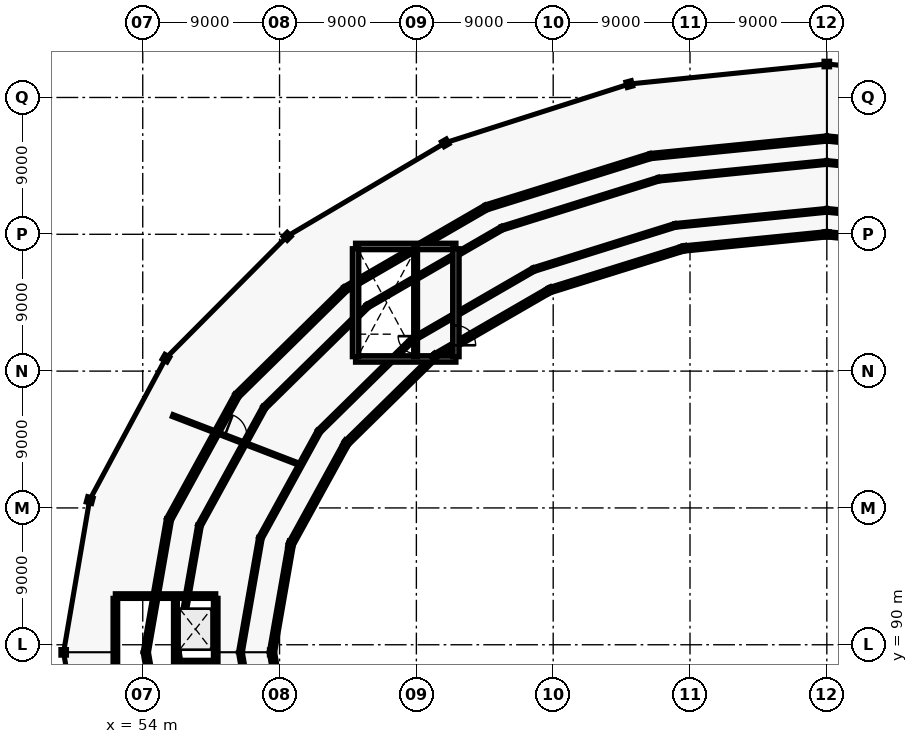
"""IFC4 building model, lengths in metres.
Left out: names, types, materials, properties, quantities, classifications, styles, units other than length and angle.
Written with IfcOpenShell. Run it as: python <this file> out.ifc"""

import sys

from ifc_helpers import new_model, si_unit, direction, frame, frame_2d, origin, origin_2d, place, context, subcontext, project, spatial, rectangle, hollow_circle, extrude, element, fill, save


model = new_model("IFC4")
c1 = context("Model", 3, precision=1e-05, world=origin(), true_north=direction((0.0, 1.0)))
c2 = subcontext(c1, "Body", "Model", "MODEL_VIEW")
j1 = project(units=[si_unit("LENGTHUNIT", "METRE"), si_unit("PLANEANGLEUNIT", "RADIAN")], contexts=[c1])
p1 = place(None, origin())
s1 = spatial("IfcSite", under=j1, at=p1, CompositionType="ELEMENT")
p2 = place(p1, origin())
s2 = spatial("IfcBuilding", under=s1, at=p2, CompositionType="ELEMENT")
p3 = place(p2, frame((0.0, 0.0, 9.6)))
s3 = spatial("IfcBuildingStorey", under=s2, at=p3, CompositionType="ELEMENT", Elevation=9.6)
p4 = place(p3, frame((99.0, 117.0, 0.0), z_axis=(0.0, 0.0, 1.0), x_axis=(0.0, 1.0, 0.0)))
e1 = element("IfcColumn", 1, at=p4, inside=s3, PredefinedType="COLUMN", context=c2, shape_type="SweptSolid", body=[
    extrude(hollow_circle(Radius=0.162, WallThickness=0.016, at=origin_2d()), origin(), (0.0, 0.0, 1.0), 4.38),
])
p5 = place(p3, frame((99.0, 128.2, 0.0), z_axis=(0.0, 0.0, 1.0), x_axis=(0.0, 1.0, 0.0)))
e2 = element("IfcColumn", 2, at=p5, inside=s3, PredefinedType="COLUMN", context=c2, shape_type="SweptSolid", body=[
    extrude(hollow_circle(Radius=0.178, WallThickness=0.016, at=origin_2d()), origin(), (0.0, 0.0, 1.0), 3.38),
])
p6 = place(p3, frame((89.553, 116.063, 0.0), z_axis=(0.0, 0.0, 1.0), x_axis=(-0.258819045103, 0.965925826289, 0.0)))
e3 = element("IfcColumn", 3, at=p6, inside=s3, PredefinedType="COLUMN", context=c2, shape_type="SweptSolid", body=[
    extrude(hollow_circle(Radius=0.162, WallThickness=0.016, at=origin_2d()), origin(), (0.0, 0.0, 1.0), 4.38),
])
p7 = place(p3, frame((86.007, 126.881, 0.0), z_axis=(0.0, 0.0, 1.0), x_axis=(-0.258819045103, 0.965925826289, 0.0)))
e4 = element("IfcColumn", 4, at=p7, inside=s3, PredefinedType="COLUMN", context=c2, shape_type="SweptSolid", body=[
    extrude(hollow_circle(Radius=0.178, WallThickness=0.016, at=origin_2d()), origin(), (0.0, 0.0, 1.0), 3.38),
])
p8 = place(p3, frame((80.75, 113.316, 0.0), z_axis=(0.0, 0.0, 1.0), x_axis=(-0.5, 0.866025403784, 0.0)))
e5 = element("IfcColumn", 5, at=p8, inside=s3, PredefinedType="COLUMN", context=c2, shape_type="SweptSolid", body=[
    extrude(hollow_circle(Radius=0.162, WallThickness=0.016, at=origin_2d()), origin(), (0.0, 0.0, 1.0), 4.38),
])
p9 = place(p3, frame((73.9, 123.015, 0.0), z_axis=(0.0, 0.0, 1.0), x_axis=(-0.5, 0.866025403784, 0.0)))
e6 = element("IfcColumn", 6, at=p9, inside=s3, PredefinedType="COLUMN", context=c2, shape_type="SweptSolid", body=[
    extrude(hollow_circle(Radius=0.178, WallThickness=0.016, at=origin_2d()), origin(), (0.0, 0.0, 1.0), 3.38),
])
p10 = place(p3, frame((73.191, 108.945, 0.0), z_axis=(0.0, 0.0, 1.0), x_axis=(-0.707106781187, 0.707106781187, 0.0)))
e7 = element("IfcColumn", 7, at=p10, inside=s3, PredefinedType="COLUMN", context=c2, shape_type="SweptSolid", body=[
    extrude(hollow_circle(Radius=0.162, WallThickness=0.016, at=origin_2d()), origin(), (0.0, 0.0, 1.0), 4.38),
])
p11 = place(p3, frame((63.503, 116.865, 0.0), z_axis=(0.0, 0.0, 1.0), x_axis=(-0.707106781187, 0.707106781187, 0.0)))
e8 = element("IfcColumn", 8, at=p11, inside=s3, PredefinedType="COLUMN", context=c2, shape_type="SweptSolid", body=[
    extrude(hollow_circle(Radius=0.178, WallThickness=0.016, at=origin_2d()), origin(), (0.0, 0.0, 1.0), 3.38),
])
p12 = place(p3, frame((67.39, 103.25, 0.0), z_axis=(0.0, 0.0, 1.0), x_axis=(-0.866025403784, 0.5, 0.0)))
e9 = element("IfcColumn", 9, at=p12, inside=s3, PredefinedType="COLUMN", context=c2, shape_type="SweptSolid", body=[
    extrude(hollow_circle(Radius=0.162, WallThickness=0.016, at=origin_2d()), origin(), (0.0, 0.0, 1.0), 4.38),
])
p13 = place(p3, frame((55.526, 108.85, 0.0), z_axis=(0.0, 0.0, 1.0), x_axis=(-0.866025403784, 0.5, 0.0)))
e10 = element("IfcColumn", 10, at=p13, inside=s3, PredefinedType="COLUMN", context=c2, shape_type="SweptSolid", body=[
    extrude(hollow_circle(Radius=0.178, WallThickness=0.016, at=origin_2d()), origin(), (0.0, 0.0, 1.0), 3.38),
])
p14 = place(p3, frame((63.744, 96.618, 0.0), z_axis=(0.0, 0.0, 1.0), x_axis=(-0.965925826289, 0.258819045103, 0.0)))
e11 = element("IfcColumn", 11, at=p14, inside=s3, PredefinedType="COLUMN", context=c2, shape_type="SweptSolid", body=[
    extrude(hollow_circle(Radius=0.162, WallThickness=0.016, at=origin_2d()), origin(), (0.0, 0.0, 1.0), 4.38),
])
p15 = place(p3, frame((50.511, 99.516, 0.0), z_axis=(0.0, 0.0, 1.0), x_axis=(-0.965925826289, 0.258819045103, 0.0)))
e12 = element("IfcColumn", 12, at=p15, inside=s3, PredefinedType="COLUMN", context=c2, shape_type="SweptSolid", body=[
    extrude(hollow_circle(Radius=0.178, WallThickness=0.016, at=origin_2d()), origin(), (0.0, 0.0, 1.0), 3.38),
])
p16 = place(p3, frame((62.5, 89.5, 0.0), z_axis=(0.0, 0.0, 1.0), x_axis=(-1.0, 0.0, 0.0)))
e13 = element("IfcColumn", 13, at=p16, inside=s3, PredefinedType="COLUMN", context=c2, shape_type="SweptSolid", body=[
    extrude(hollow_circle(Radius=0.162, WallThickness=0.016, at=origin_2d()), origin(), (0.0, 0.0, 1.0), 4.38),
])
p17 = place(p3, frame((48.8, 89.5, 0.0), z_axis=(0.0, 0.0, 1.0), x_axis=(-1.0, 0.0, 0.0)))
e14 = element("IfcColumn", 14, at=p17, inside=s3, PredefinedType="COLUMN", context=c2, shape_type="SweptSolid", body=[
    extrude(hollow_circle(Radius=0.178, WallThickness=0.016, at=origin_2d()), origin(), (0.0, 0.0, 1.0), 3.38),
])
p18 = place(p3, frame((110.595, 122.148, 4.53), z_axis=(0.0, 0.0, 1.0), x_axis=(-0.995099849345, 0.098875122419, 0.0)))
e15 = element("IfcWall", 15, at=p18, inside=s3, PredefinedType="SOLIDWALL", context=c2, shape_type="SweptSolid", body=[
    extrude(rectangle(XDim=11.652, YDim=0.34, at=frame_2d((5.826, 0.0))), origin(), (0.0, 0.0, 1.0), 3.02),
])
p19 = place(p3, frame((108.447, 116.063, 4.39), z_axis=(0.0, 0.0, 1.0), x_axis=(-0.995117073258, 0.098701623651, 0.0)))
e16 = element("IfcWall", 16, at=p19, inside=s3, PredefinedType="SOLIDWALL", context=c2, shape_type="SweptSolid", body=[
    extrude(rectangle(XDim=9.493, YDim=0.34, at=frame_2d((4.747, 0.0))), origin(), (0.0, 0.0, 1.0), 3.16),
])
p20 = place(p3, frame((110.058, 120.627, 7.58), z_axis=(0.0, 0.0, 1.0), x_axis=(-0.995105258288, 0.098820670548, 0.0)))
e17 = element("IfcWall", 17, at=p20, inside=s3, PredefinedType="SOLIDWALL", context=c2, shape_type="SweptSolid", body=[
    extrude(rectangle(XDim=11.113, YDim=0.24, at=frame_2d((5.556, 0.0))), origin(), (0.0, 0.0, 1.0), 2.37),
])
p21 = place(p3, frame((108.984, 117.584, 7.58), z_axis=(0.0, 0.0, 1.0), x_axis=(-0.995110163253, 0.098771266021, 0.0)))
e18 = element("IfcWall", 18, at=p21, inside=s3, PredefinedType="SOLIDWALL", context=c2, shape_type="SweptSolid", body=[
    extrude(rectangle(XDim=10.033, YDim=0.24, at=frame_2d((5.017, 0.0))), origin(), (0.0, 0.0, 1.0), 2.37),
])
p22 = place(p3, frame((99.0, 123.3, 4.53), z_axis=(0.0, 0.0, 1.0), x_axis=(-0.995099849345, -0.098875122419, 0.0)))
e19 = element("IfcWall", 19, at=p22, inside=s3, PredefinedType="SOLIDWALL", context=c2, shape_type="SweptSolid", body=[
    extrude(rectangle(XDim=11.652, YDim=0.34, at=frame_2d((5.826, 0.0))), origin(), (0.0, 0.0, 1.0), 3.02),
])
p23 = place(p3, frame((99.0, 117.0, 4.39), z_axis=(0.0, 0.0, 1.0), x_axis=(-0.995117073258, -0.098701623651, 0.0)))
e20 = element("IfcWall", 20, at=p23, inside=s3, PredefinedType="SOLIDWALL", context=c2, shape_type="SweptSolid", body=[
    extrude(rectangle(XDim=9.493, YDim=0.34, at=frame_2d((4.747, 0.0))), origin(), (0.0, 0.0, 1.0), 3.16),
])
p24 = place(p3, frame((99.0, 121.725, 7.58), z_axis=(0.0, 0.0, 1.0), x_axis=(-0.995105258288, -0.098820670548, 0.0)))
e21 = element("IfcWall", 21, at=p24, inside=s3, PredefinedType="SOLIDWALL", context=c2, shape_type="SweptSolid", body=[
    extrude(rectangle(XDim=11.113, YDim=0.24, at=frame_2d((5.556, 0.0))), origin(), (0.0, 0.0, 1.0), 2.37),
])
p25 = place(p3, frame((99.0, 118.575, 7.58), z_axis=(0.0, 0.0, 1.0), x_axis=(-0.995110163253, -0.098771266021, 0.0)))
e22 = element("IfcWall", 22, at=p25, inside=s3, PredefinedType="SOLIDWALL", context=c2, shape_type="SweptSolid", body=[
    extrude(rectangle(XDim=10.033, YDim=0.24, at=frame_2d((5.017, 0.0))), origin(), (0.0, 0.0, 1.0), 2.37),
])
p26 = place(p3, frame((87.405, 122.148, 4.53), z_axis=(0.0, 0.0, 1.0), x_axis=(-0.95449417592, -0.298229556107, 0.0)))
e23 = element("IfcWall", 23, at=p26, inside=s3, PredefinedType="SOLIDWALL", context=c2, shape_type="SweptSolid", body=[
    extrude(rectangle(XDim=11.32, YDim=0.34, at=frame_2d((5.66, 0.0))), origin(), (0.0, 0.0, 1.0), 3.02),
])
p27 = place(p3, frame((89.553, 116.063, 4.39), z_axis=(0.0, 0.0, 1.0), x_axis=(-0.9545990852, -0.297893582568, 0.0)))
e24 = element("IfcWall", 24, at=p27, inside=s3, PredefinedType="SOLIDWALL", context=c2, shape_type="SweptSolid", body=[
    extrude(rectangle(XDim=9.222, YDim=0.34, at=frame_2d((4.611, 0.0))), origin(), (0.0, 0.0, 1.0), 3.16),
])
p28 = place(p3, frame((87.942, 120.627, 7.58), z_axis=(0.0, 0.0, 1.0), x_axis=(-0.954506131601, -0.298191288832, 0.0)))
e25 = element("IfcWall", 25, at=p28, inside=s3, PredefinedType="SOLIDWALL", context=c2, shape_type="SweptSolid", body=[
    extrude(rectangle(XDim=10.795, YDim=0.24, at=frame_2d((5.397, 0.0))), origin(), (0.0, 0.0, 1.0), 2.37),
])
p29 = place(p3, frame((89.016, 117.584, 7.58), z_axis=(0.0, 0.0, 1.0), x_axis=(-0.954573536026, -0.297975442477, 0.0)))
e26 = element("IfcWall", 26, at=p29, inside=s3, PredefinedType="SOLIDWALL", context=c2, shape_type="SweptSolid", body=[
    extrude(rectangle(XDim=9.746, YDim=0.24, at=frame_2d((4.873, 0.0))), origin(), (0.0, 0.0, 1.0), 2.37),
])
p30 = place(p3, frame((76.6, 118.772, 4.53), z_axis=(0.0, 0.0, 1.0), x_axis=(-0.865403937833, -0.501074869039, 0.0)))
e27 = element("IfcWall", 27, at=p30, inside=s3, PredefinedType="SOLIDWALL", context=c2, shape_type="SweptSolid", body=[
    extrude(rectangle(XDim=10.721, YDim=0.34, at=frame_2d((5.361, 0.0))), origin(), (0.0, 0.0, 1.0), 3.02),
])
p31 = place(p3, frame((80.75, 113.316, 4.39), z_axis=(0.0, 0.0, 1.0), x_axis=(-0.865697347457, -0.500567780231, 0.0)))
e28 = element("IfcWall", 28, at=p31, inside=s3, PredefinedType="SOLIDWALL", context=c2, shape_type="SweptSolid", body=[
    extrude(rectangle(XDim=8.732, YDim=0.34, at=frame_2d((4.366, 0.0))), origin(), (0.0, 0.0, 1.0), 3.16),
])
p32 = place(p3, frame((77.638, 117.408, 7.58), z_axis=(0.0, 0.0, 1.0), x_axis=(-0.865518915909, -0.50087623841, 0.0)))
e29 = element("IfcWall", 29, at=p32, inside=s3, PredefinedType="SOLIDWALL", context=c2, shape_type="SweptSolid", body=[
    extrude(rectangle(XDim=10.224, YDim=0.24, at=frame_2d((5.112, 0.0))), origin(), (0.0, 0.0, 1.0), 2.37),
])
p33 = place(p3, frame((79.713, 114.68, 7.58), z_axis=(0.0, 0.0, 1.0), x_axis=(-0.865657994778, -0.500635831795, 0.0)))
e30 = element("IfcWall", 30, at=p33, inside=s3, PredefinedType="SOLIDWALL", context=c2, shape_type="SweptSolid", body=[
    extrude(rectangle(XDim=9.23, YDim=0.24, at=frame_2d((4.615, 0.0))), origin(), (0.0, 0.0, 1.0), 2.37),
])
p34 = place(p3, frame((67.322, 113.4, 4.53), z_axis=(0.0, 0.0, 1.0), x_axis=(-0.713096204455, -0.701066190307, 0.0)))
e31 = element("IfcWall", 31, at=p34, inside=s3, PredefinedType="SOLIDWALL", context=c2, shape_type="SweptSolid", body=[
    extrude(rectangle(XDim=9.985, YDim=0.34, at=frame_2d((4.992, 0.0))), origin(), (0.0, 0.0, 1.0), 3.02),
])
p35 = place(p3, frame((73.191, 108.945, 4.39), z_axis=(0.0, 0.0, 1.0), x_axis=(-0.713593723838, -0.700559774251, 0.0)))
e32 = element("IfcWall", 32, at=p35, inside=s3, PredefinedType="SOLIDWALL", context=c2, shape_type="SweptSolid", body=[
    extrude(rectangle(XDim=8.129, YDim=0.34, at=frame_2d((4.065, 0.0))), origin(), (0.0, 0.0, 1.0), 3.16),
])
p36 = place(p3, frame((68.789, 112.287, 7.58), z_axis=(0.0, 0.0, 1.0), x_axis=(-0.71311938496, -0.701042611254, 0.0)))
e33 = element("IfcWall", 33, at=p36, inside=s3, PredefinedType="SOLIDWALL", context=c2, shape_type="SweptSolid", body=[
    extrude(rectangle(XDim=9.521, YDim=0.24, at=frame_2d((4.761, 0.0))), origin(), (0.0, 0.0, 1.0), 2.37),
])
p37 = place(p3, frame((71.723, 110.059, 7.58), z_axis=(0.0, 0.0, 1.0), x_axis=(-0.713357861119, -0.700799944335, 0.0)))
e34 = element("IfcWall", 34, at=p37, inside=s3, PredefinedType="SOLIDWALL", context=c2, shape_type="SweptSolid", body=[
    extrude(rectangle(XDim=8.593, YDim=0.24, at=frame_2d((4.296, 0.0))), origin(), (0.0, 0.0, 1.0), 2.37),
])
p38 = place(p3, frame((60.202, 106.4, 4.53), z_axis=(0.0, 0.0, 1.0), x_axis=(-0.481203038707, -0.876609169208, 0.0)))
e35 = element("IfcWall", 35, at=p38, inside=s3, PredefinedType="SOLIDWALL", context=c2, shape_type="SweptSolid", body=[
    extrude(rectangle(XDim=9.299, YDim=0.34, at=frame_2d((4.65, 0.0))), origin(), (0.0, 0.0, 1.0), 3.02),
])
p39 = place(p3, frame((67.39, 103.25, 4.39), z_axis=(0.0, 0.0, 1.0), x_axis=(-0.481751565348, -0.876307839338, 0.0)))
e36 = element("IfcWall", 36, at=p39, inside=s3, PredefinedType="SOLIDWALL", context=c2, shape_type="SweptSolid", body=[
    extrude(rectangle(XDim=7.568, YDim=0.34, at=frame_2d((3.784, 0.0))), origin(), (0.0, 0.0, 1.0), 3.16),
])
p40 = place(p3, frame((61.999, 105.612, 7.58), z_axis=(0.0, 0.0, 1.0), x_axis=(-0.481354223541, -0.87652616132, 0.0)))
e37 = element("IfcWall", 37, at=p40, inside=s3, PredefinedType="SOLIDWALL", context=c2, shape_type="SweptSolid", body=[
    extrude(rectangle(XDim=8.867, YDim=0.24, at=frame_2d((4.433, 0.0))), origin(), (0.0, 0.0, 1.0), 2.37),
])
p41 = place(p3, frame((65.593, 104.037, 7.58), z_axis=(0.0, 0.0, 1.0), x_axis=(-0.481658705075, -0.876358883007, 0.0)))
e38 = element("IfcWall", 38, at=p41, inside=s3, PredefinedType="SOLIDWALL", context=c2, shape_type="SweptSolid", body=[
    extrude(rectangle(XDim=8.001, YDim=0.24, at=frame_2d((4.001, 0.0))), origin(), (0.0, 0.0, 1.0), 2.37),
])
p42 = place(p3, frame((55.727, 98.248, 4.53), z_axis=(0.0, 0.0, 1.0), x_axis=(-0.171964181022, -0.985103202941, 0.0)))
e39 = element("IfcWall", 39, at=p42, inside=s3, PredefinedType="SOLIDWALL", context=c2, shape_type="SweptSolid", body=[
    extrude(rectangle(XDim=8.88, YDim=0.34, at=frame_2d((4.44, 0.0))), origin(), (0.0, 0.0, 1.0), 3.02),
])
p43 = place(p3, frame((63.744, 96.618, 4.39), z_axis=(0.0, 0.0, 1.0), x_axis=(-0.172146745201, -0.985071316259, 0.0)))
e40 = element("IfcWall", 40, at=p43, inside=s3, PredefinedType="SOLIDWALL", context=c2, shape_type="SweptSolid", body=[
    extrude(rectangle(XDim=7.226, YDim=0.34, at=frame_2d((3.613, 0.0))), origin(), (0.0, 0.0, 1.0), 3.16),
])
p44 = place(p3, frame((57.731, 97.84, 7.58), z_axis=(0.0, 0.0, 1.0), x_axis=(-0.171983700119, -0.985099795398, 0.0)))
e41 = element("IfcWall", 41, at=p44, inside=s3, PredefinedType="SOLIDWALL", context=c2, shape_type="SweptSolid", body=[
    extrude(rectangle(XDim=8.466, YDim=0.24, at=frame_2d((4.233, 0.0))), origin(), (0.0, 0.0, 1.0), 2.37),
])
p45 = place(p3, frame((61.739, 97.025, 7.58), z_axis=(0.0, 0.0, 1.0), x_axis=(-0.172012838792, -0.985094707777, 0.0)))
e42 = element("IfcWall", 42, at=p45, inside=s3, PredefinedType="SOLIDWALL", context=c2, shape_type="SweptSolid", body=[
    extrude(rectangle(XDim=7.639, YDim=0.24, at=frame_2d((3.819, 0.0))), origin(), (0.0, 0.0, 1.0), 2.37),
])
p46 = place(p3, frame((54.2, 89.5, 4.53), z_axis=(0.0, 0.0, 1.0), x_axis=(0.171964181022, -0.985103202941, 0.0)))
e43 = element("IfcWall", 43, at=p46, inside=s3, PredefinedType="SOLIDWALL", context=c2, shape_type="SweptSolid", body=[
    extrude(rectangle(XDim=8.88, YDim=0.34, at=frame_2d((4.44, 0.0))), origin(), (0.0, 0.0, 1.0), 3.02),
])
p47 = place(p3, frame((62.5, 89.5, 4.39), z_axis=(0.0, 0.0, 1.0), x_axis=(0.172146745201, -0.985071316259, 0.0)))
e44 = element("IfcWall", 44, at=p47, inside=s3, PredefinedType="SOLIDWALL", context=c2, shape_type="SweptSolid", body=[
    extrude(rectangle(XDim=7.226, YDim=0.34, at=frame_2d((3.613, 0.0))), origin(), (0.0, 0.0, 1.0), 3.16),
])
p48 = place(p3, frame((56.275, 89.5, 7.58), z_axis=(0.0, 0.0, 1.0), x_axis=(0.171983700119, -0.985099795398, 0.0)))
e45 = element("IfcWall", 45, at=p48, inside=s3, PredefinedType="SOLIDWALL", context=c2, shape_type="SweptSolid", body=[
    extrude(rectangle(XDim=8.466, YDim=0.24, at=frame_2d((4.233, 0.0))), origin(), (0.0, 0.0, 1.0), 2.37),
])
p49 = place(p3, frame((60.425, 89.5, 7.58), z_axis=(0.0, 0.0, 1.0), x_axis=(0.172012838792, -0.985094707777, 0.0)))
e46 = element("IfcWall", 46, at=p49, inside=s3, PredefinedType="SOLIDWALL", context=c2, shape_type="SweptSolid", body=[
    extrude(rectangle(XDim=7.639, YDim=0.24, at=frame_2d((3.819, 0.0))), origin(), (0.0, 0.0, 1.0), 2.37),
])
p50 = place(p3, frame((52.2, 93.2, 0.0), z_axis=(0.0, 0.0, 1.0), x_axis=(1.0, 0.0, 0.0)))
e47 = element("IfcWall", 47, at=p50, inside=s3, PredefinedType="SHEAR", context=c2, shape_type="SweptSolid", body=[
    extrude(rectangle(XDim=6.6, YDim=0.3, at=frame_2d((3.3, 0.0))), origin(), (0.0, 0.0, 1.0), 3.4),
])
p51 = place(p3, frame((52.2, 85.95, 0.0), z_axis=(0.0, 0.0, 1.0), x_axis=(0.0, 1.0, 0.0)))
e48 = element("IfcWall", 48, at=p51, inside=s3, PredefinedType="SHEAR", context=c2, shape_type="SweptSolid", body=[
    extrude(rectangle(XDim=7.1, YDim=0.3, at=frame_2d((3.55, 0.0))), origin(), (0.0, 0.0, 1.0), 3.4),
])
p52 = place(p3, frame((58.8, 85.95, 0.0), z_axis=(0.0, 0.0, 1.0), x_axis=(0.0, 1.0, 0.0)))
e49 = element("IfcWall", 49, at=p52, inside=s3, PredefinedType="SHEAR", context=c2, shape_type="SweptSolid", body=[
    extrude(rectangle(XDim=7.1, YDim=0.3, at=frame_2d((3.55, 0.0))), origin(), (0.0, 0.0, 1.0), 3.4),
])
p53 = place(p52, frame((0.75, 0.0, 0.0)))
e50 = element("IfcOpeningElement", 50, at=p53, cuts=e49, PredefinedType="OPENING", context=c2, shape_type="SweptSolid", body=[
    extrude(rectangle(XDim=1.3, YDim=2.15, at=frame_2d((0.65, 1.075))), frame((0.0, 0.16, 0.0), z_axis=(0.0, -1.0, 0.0), x_axis=(1.0, 0.0, 0.0)), (0.0, 0.0, 1.0), 0.32),
])
p54 = place(p3, frame((56.15, 85.95, 0.0), z_axis=(0.0, 0.0, 1.0), x_axis=(0.0, 1.0, 0.0)))
e51 = element("IfcWall", 51, at=p54, inside=s3, PredefinedType="SHEAR", context=c2, shape_type="SweptSolid", body=[
    extrude(rectangle(XDim=7.1, YDim=0.25, at=frame_2d((3.55, 0.0))), origin(), (0.0, 0.0, 1.0), 3.4),
])
p55 = place(p54, frame((0.2, 0.0, 0.0)))
e52 = element("IfcOpeningElement", 52, at=p55, cuts=e51, PredefinedType="OPENING", context=c2, shape_type="SweptSolid", body=[
    extrude(rectangle(XDim=1.15, YDim=2.15, at=frame_2d((0.575, 1.075))), frame((0.0, 0.135, 0.0), z_axis=(0.0, -1.0, 0.0), x_axis=(1.0, 0.0, 0.0)), (0.0, 0.0, 1.0), 0.27),
])
p56 = place(p3, frame((56.27, 88.85, 0.0), z_axis=(0.0, 0.0, 1.0), x_axis=(1.0, 0.0, 0.0)))
e53 = element("IfcWall", 53, at=p56, inside=s3, PredefinedType="SHEAR", context=c2, shape_type="SweptSolid", body=[
    extrude(rectangle(XDim=2.38, YDim=0.25, at=frame_2d((1.19, 0.0))), origin(), (0.0, 0.0, 1.0), 3.4),
])
p57 = place(p56, frame((0.39, 0.0, 0.0)))
e54 = element("IfcOpeningElement", 54, at=p57, cuts=e53, PredefinedType="OPENING", context=c2, shape_type="SweptSolid", body=[
    extrude(rectangle(XDim=1.6, YDim=2.3, at=frame_2d((0.8, 1.15))), frame((0.0, 0.135, 0.0), z_axis=(0.0, -1.0, 0.0), x_axis=(1.0, 0.0, 0.0)), (0.0, 0.0, 1.0), 0.27),
])
for number, where, z_axis, x_axis in (
    (55, (68.0, 108.8, 0.0), (0.0, 0.0, 1.0), (1.0, 0.0, 0.0)),
    (56, (68.0, 116.2, 0.0), (0.0, 0.0, 1.0), (1.0, 0.0, 0.0)),
):
    element("IfcWall", number, at=place(p3, frame(where, z_axis=z_axis, x_axis=x_axis)), inside=s3, PredefinedType="SHEAR", context=c2, shape_type="SweptSolid", body=[
        extrude(rectangle(XDim=6.6, YDim=0.42, at=frame_2d((3.3, 0.0))), origin(), (0.0, 0.0, 1.0), 3.4),
    ])
p58 = place(p3, frame((68.0, 108.95, 0.0), z_axis=(0.0, 0.0, 1.0), x_axis=(0.0, 1.0, 0.0)))
e57 = element("IfcWall", 57, at=p58, inside=s3, PredefinedType="SHEAR", context=c2, shape_type="SweptSolid", body=[
    extrude(rectangle(XDim=7.1, YDim=0.42, at=frame_2d((3.55, 0.0))), origin(), (0.0, 0.0, 1.0), 3.4),
])
p59 = place(p3, frame((74.6, 108.95, 0.0), z_axis=(0.0, 0.0, 1.0), x_axis=(0.0, 1.0, 0.0)))
e58 = element("IfcWall", 58, at=p59, inside=s3, PredefinedType="SHEAR", context=c2, shape_type="SweptSolid", body=[
    extrude(rectangle(XDim=7.1, YDim=0.42, at=frame_2d((3.55, 0.0))), origin(), (0.0, 0.0, 1.0), 3.4),
])
p60 = place(p59, frame((0.75, 0.0, 0.0)))
e59 = element("IfcOpeningElement", 59, at=p60, cuts=e58, PredefinedType="OPENING", context=c2, shape_type="SweptSolid", body=[
    extrude(rectangle(XDim=1.3, YDim=2.15, at=frame_2d((0.65, 1.075))), frame((0.0, 0.22, 0.0), z_axis=(0.0, -1.0, 0.0), x_axis=(1.0, 0.0, 0.0)), (0.0, 0.0, 1.0), 0.44),
])
p61 = place(p3, frame((71.95, 108.95, 0.0), z_axis=(0.0, 0.0, 1.0), x_axis=(0.0, 1.0, 0.0)))
e60 = element("IfcWall", 60, at=p61, inside=s3, PredefinedType="SHEAR", context=c2, shape_type="SweptSolid", body=[
    extrude(rectangle(XDim=7.1, YDim=0.25, at=frame_2d((3.55, 0.0))), origin(), (0.0, 0.0, 1.0), 3.4),
])
p62 = place(p61, frame((0.2, 0.0, 0.0)))
e61 = element("IfcOpeningElement", 61, at=p62, cuts=e60, PredefinedType="OPENING", context=c2, shape_type="SweptSolid", body=[
    extrude(rectangle(XDim=1.15, YDim=2.15, at=frame_2d((0.575, 1.075))), frame((0.0, 0.135, 0.0), z_axis=(0.0, -1.0, 0.0), x_axis=(1.0, 0.0, 0.0)), (0.0, 0.0, 1.0), 0.27),
])
p63 = place(p3, frame((64.17, 101.918, 0.0), z_axis=(0.0, 0.0, 1.0), x_axis=(-0.933238808021, 0.359256631399, 0.0)))
e62 = element("IfcWall", 62, at=p63, inside=s3, PredefinedType="PARTITIONING", context=c2, shape_type="SweptSolid", body=[
    extrude(rectangle(XDim=8.782, YDim=0.13, at=frame_2d((4.391, 0.0))), origin(), (0.0, 0.0, 1.0), 2.9),
])
p64 = place(p63, frame((3.666, 0.0, 0.0)))
e63 = element("IfcOpeningElement", 63, at=p64, cuts=e62, PredefinedType="OPENING", context=c2, shape_type="SweptSolid", body=[
    extrude(rectangle(XDim=1.45, YDim=2.15, at=frame_2d((0.725, 1.075))), frame((0.0, 0.075, 0.0), z_axis=(0.0, -1.0, 0.0), x_axis=(1.0, 0.0, 0.0)), (0.0, 0.0, 1.0), 0.15),
])
p65 = place(p57, origin())
e64 = element("IfcDoor", 64, at=p65, inside=s3, OperationType="SLIDING_TO_LEFT", PredefinedType="DOOR", context=c2, shape_type="SweptSolid", body=[
    extrude(rectangle(XDim=1.6, YDim=2.3, at=frame_2d((0.8, 1.15))), frame((0.0, 0.025, 0.0), z_axis=(0.0, -1.0, 0.0), x_axis=(1.0, 0.0, 0.0)), (0.0, 0.0, 1.0), 0.05),
])
fill(e54, e64)
p66 = place(p60, frame((1.3, 0.0, 0.0), z_axis=(0.0, 0.0, 1.0), x_axis=(-1.0, 0.0, 0.0)))
e65 = element("IfcDoor", 65, at=p66, inside=s3, OperationType="DOUBLE_DOOR_SINGLE_SWING", PredefinedType="DOOR", context=c2, shape_type="SweptSolid", body=[
    extrude(rectangle(XDim=1.3, YDim=2.15, at=frame_2d((0.65, 1.075))), frame((0.0, 0.025, 0.0), z_axis=(0.0, -1.0, 0.0), x_axis=(1.0, 0.0, 0.0)), (0.0, 0.0, 1.0), 0.05),
])
fill(e59, e65)
p67 = place(p62, frame((1.15, 0.0, 0.0), z_axis=(0.0, 0.0, 1.0), x_axis=(-1.0, 0.0, 0.0)))
e66 = element("IfcDoor", 66, at=p67, inside=s3, OperationType="SINGLE_SWING_RIGHT", PredefinedType="DOOR", context=c2, shape_type="SweptSolid", body=[
    extrude(rectangle(XDim=1.15, YDim=2.15, at=frame_2d((0.575, 1.075))), frame((0.0, 0.025, 0.0), z_axis=(0.0, -1.0, 0.0), x_axis=(1.0, 0.0, 0.0)), (0.0, 0.0, 1.0), 0.05),
])
fill(e61, e66)
p68 = place(p64, origin())
e67 = element("IfcDoor", 67, at=p68, inside=s3, OperationType="SINGLE_SWING_RIGHT", PredefinedType="DOOR", context=c2, shape_type="SweptSolid", body=[
    extrude(rectangle(XDim=1.45, YDim=2.15, at=frame_2d((0.725, 1.075))), frame((0.0, 0.025, 0.0), z_axis=(0.0, -1.0, 0.0), x_axis=(1.0, 0.0, 0.0)), (0.0, 0.0, 1.0), 0.05),
])
fill(e63, e67)
save(model, sys.argv[1])
